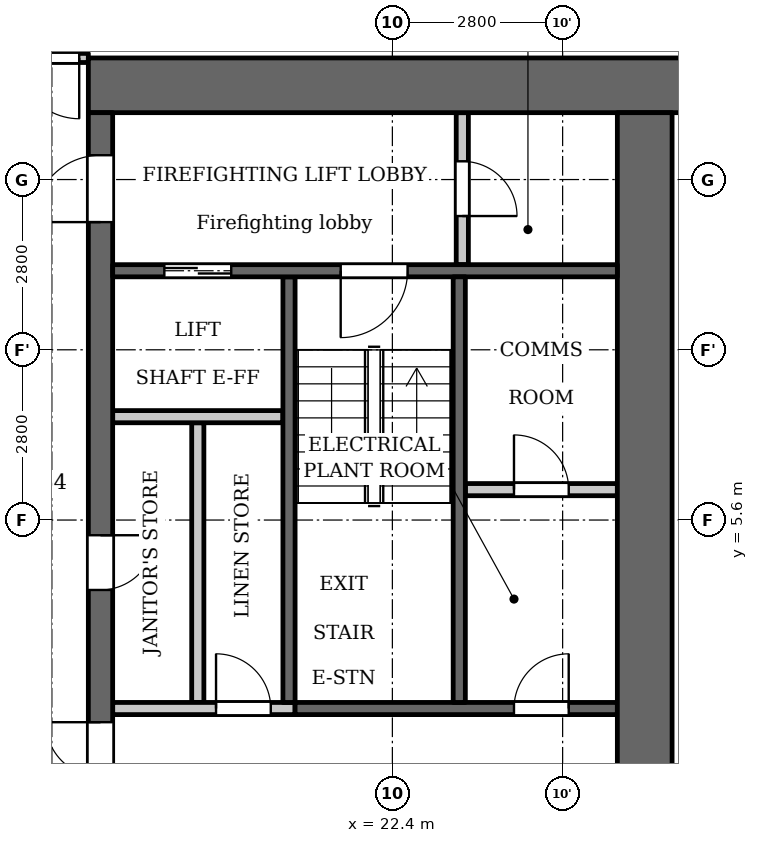
"""IFC4 building model, lengths in metres.
Left out: names, types, materials, properties, quantities, classifications, styles, units other than length and angle.
Written with IfcOpenShell. Run it as: python <this file> out.ifc"""

import sys

from ifc_helpers import new_model, si_unit, direction, frame, frame_2d, origin, place, context, subcontext, project, spatial, rectangle, extrude, element, fill, save


model = new_model("IFC4")
c1 = context("Model", 3, precision=1e-05, world=origin(), true_north=direction((0.0, 1.0)))
c2 = subcontext(c1, "Body", "Model", "MODEL_VIEW")
j1 = project(units=[si_unit("LENGTHUNIT", "METRE"), si_unit("PLANEANGLEUNIT", "RADIAN")], contexts=[c1])
p1 = place(None, origin())
s1 = spatial("IfcSite", under=j1, at=p1, CompositionType="ELEMENT")
p2 = place(p1, origin())
s2 = spatial("IfcBuilding", under=s1, at=p2, CompositionType="ELEMENT")
p3 = place(p2, frame((0.0, 0.0, 118.3)))
s3 = spatial("IfcBuildingStorey", under=s2, at=p3, CompositionType="ELEMENT", Elevation=118.3)
p4 = place(p3, frame((20.7, 2.6, 0.0), z_axis=(0.0, 0.0, 1.0), x_axis=(0.0, 1.0, 0.0)))
e1 = element("IfcWall", 1, at=p4, inside=s3, PredefinedType="SHEAR", context=c2, shape_type="SweptSolid", body=[
    extrude(rectangle(XDim=7.0, YDim=0.2, at=frame_2d((3.5, 0.0))), origin(), (0.0, 0.0, 1.0), 3.2),
])
p5 = place(p3, frame((20.8, 2.5, 0.0), z_axis=(0.0, 0.0, 1.0), x_axis=(1.0, 0.0, 0.0)))
e2 = element("IfcWall", 2, at=p5, inside=s3, PredefinedType="SHEAR", context=c2, shape_type="SweptSolid", body=[
    extrude(rectangle(XDim=5.3, YDim=0.2, at=frame_2d((2.65, 0.0))), origin(), (0.0, 0.0, 1.0), 3.2),
])
p6 = place(p5, frame((3.6, 0.0, 0.0)))
e3 = element("IfcOpeningElement", 3, at=p6, cuts=e2, PredefinedType="OPENING", context=c2, shape_type="SweptSolid", body=[
    extrude(rectangle(XDim=0.9, YDim=2.1, at=frame_2d((0.45, 1.05))), frame((0.0, 0.11, 0.0), z_axis=(0.0, -1.0, 0.0), x_axis=(1.0, 0.0, 0.0)), (0.0, 0.0, 1.0), 0.22),
])
p7 = place(p3, frame((17.4, 12.75, 0.0), z_axis=(0.0, 0.0, 1.0), x_axis=(1.0, 0.0, 0.0)))
e4 = element("IfcWall", 4, at=p7, inside=s3, PredefinedType="SHEAR", context=c2, shape_type="SweptSolid", body=[
    extrude(rectangle(XDim=10.4, YDim=0.9, at=frame_2d((5.2, 0.0))), origin(), (0.0, 0.0, 1.0), 3.2),
])
p8 = place(p3, frame((19.2, 2.6, 0.0), z_axis=(0.0, 0.0, 1.0), x_axis=(0.0, 1.0, 0.0)))
e5 = element("IfcWall", 5, at=p8, inside=s3, PredefinedType="PARTITIONING", context=c2, shape_type="SweptSolid", body=[
    extrude(rectangle(XDim=4.6, YDim=0.2, at=frame_2d((2.3, 0.0))), origin(), (0.0, 0.0, 1.0), 3.2),
])
p9 = place(p3, frame((17.6, -12.3, 0.0), z_axis=(0.0, 0.0, 1.0), x_axis=(0.0, 1.0, 0.0)))
e6 = element("IfcWall", 6, at=p9, inside=s3, PredefinedType="SHEAR", context=c2, shape_type="SweptSolid", body=[
    extrude(rectangle(XDim=24.6, YDim=0.4, at=frame_2d((12.3, 0.0))), origin(), (0.0, 0.0, 1.0), 3.2),
])
p10 = place(p9, frame((6.0, 0.0, 0.0)))
e7 = element("IfcOpeningElement", 7, at=p10, cuts=e6, PredefinedType="OPENING", context=c2, shape_type="SweptSolid", body=[
    extrude(rectangle(XDim=1.1, YDim=2.1, at=frame_2d((0.55, 1.05))), frame((0.0, 0.21, 0.0), z_axis=(0.0, -1.0, 0.0), x_axis=(1.0, 0.0, 0.0)), (0.0, 0.0, 1.0), 0.42),
])
p11 = place(p9, frame((8.4, 0.0, 0.0)))
e8 = element("IfcOpeningElement", 8, at=p11, cuts=e6, PredefinedType="OPENING", context=c2, shape_type="SweptSolid", body=[
    extrude(rectangle(XDim=1.1, YDim=2.1, at=frame_2d((0.55, 1.05))), frame((0.0, 0.21, 0.0), z_axis=(0.0, -1.0, 0.0), x_axis=(1.0, 0.0, 0.0)), (0.0, 0.0, 1.0), 0.42),
])
p12 = place(p9, frame((10.8, 0.0, 0.0)))
e9 = element("IfcOpeningElement", 9, at=p12, cuts=e6, PredefinedType="OPENING", context=c2, shape_type="SweptSolid", body=[
    extrude(rectangle(XDim=1.1, YDim=2.1, at=frame_2d((0.55, 1.05))), frame((0.0, 0.21, 0.0), z_axis=(0.0, -1.0, 0.0), x_axis=(1.0, 0.0, 0.0)), (0.0, 0.0, 1.0), 0.42),
])
p13 = place(p9, frame((16.75, 0.0, 0.0)))
e10 = element("IfcOpeningElement", 10, at=p13, cuts=e6, PredefinedType="OPENING", context=c2, shape_type="SweptSolid", body=[
    extrude(rectangle(XDim=0.9, YDim=2.1, at=frame_2d((0.45, 1.05))), frame((0.0, 0.21, 0.0), z_axis=(0.0, -1.0, 0.0), x_axis=(1.0, 0.0, 0.0)), (0.0, 0.0, 1.0), 0.42),
])
p14 = place(p9, frame((22.8, 0.0, 0.0)))
e11 = element("IfcOpeningElement", 11, at=p14, cuts=e6, PredefinedType="OPENING", context=c2, shape_type="SweptSolid", body=[
    extrude(rectangle(XDim=1.1, YDim=2.1, at=frame_2d((0.55, 1.05))), frame((0.0, 0.21, 0.0), z_axis=(0.0, -1.0, 0.0), x_axis=(1.0, 0.0, 0.0)), (0.0, 0.0, 1.0), 0.42),
])
p15 = place(p9, frame((0.7, 0.0, 0.0)))
e12 = element("IfcOpeningElement", 12, at=p15, cuts=e6, PredefinedType="OPENING", context=c2, shape_type="SweptSolid", body=[
    extrude(rectangle(XDim=1.1, YDim=2.1, at=frame_2d((0.55, 1.05))), frame((0.0, 0.21, 0.0), z_axis=(0.0, -1.0, 0.0), x_axis=(1.0, 0.0, 0.0)), (0.0, 0.0, 1.0), 0.42),
])
p16 = place(p9, frame((12.775, 0.0, 0.0)))
e13 = element("IfcOpeningElement", 13, at=p16, cuts=e6, PredefinedType="OPENING", context=c2, shape_type="SweptSolid", body=[
    extrude(rectangle(XDim=1.8, YDim=2.1, at=frame_2d((0.9, 1.05))), frame((0.0, 0.21, 0.0), z_axis=(0.0, -1.0, 0.0), x_axis=(1.0, 0.0, 0.0)), (0.0, 0.0, 1.0), 0.42),
])
p17 = place(p3, frame((26.55, -12.3, 0.0), z_axis=(0.0, 0.0, 1.0), x_axis=(0.0, 1.0, 0.0)))
e14 = element("IfcWall", 14, at=p17, inside=s3, PredefinedType="SHEAR", context=c2, shape_type="SweptSolid", body=[
    extrude(rectangle(XDim=24.6, YDim=0.9, at=frame_2d((12.3, 0.0))), origin(), (0.0, 0.0, 1.0), 3.2),
])
p18 = place(p3, frame((23.55, 9.8, 0.0), z_axis=(0.0, 0.0, 1.0), x_axis=(0.0, 1.0, 0.0)))
e15 = element("IfcWall", 15, at=p18, inside=s3, PredefinedType="PARTITIONING", context=c2, shape_type="SweptSolid", body=[
    extrude(rectangle(XDim=2.5, YDim=0.2, at=frame_2d((1.25, 0.0))), origin(), (0.0, 0.0, 1.0), 3.2),
])
p19 = place(p18, frame((0.8, 0.0, 0.0)))
e16 = element("IfcOpeningElement", 16, at=p19, cuts=e15, PredefinedType="OPENING", context=c2, shape_type="SweptSolid", body=[
    extrude(rectangle(XDim=0.9, YDim=2.1, at=frame_2d((0.45, 1.05))), frame((0.0, 0.11, 0.0), z_axis=(0.0, -1.0, 0.0), x_axis=(1.0, 0.0, 0.0)), (0.0, 0.0, 1.0), 0.22),
])
p20 = place(p3, frame((23.6, 6.1, 0.0), z_axis=(0.0, 0.0, 1.0), x_axis=(1.0, 0.0, 0.0)))
e17 = element("IfcWall", 17, at=p20, inside=s3, PredefinedType="PARTITIONING", context=c2, shape_type="SweptSolid", body=[
    extrude(rectangle(XDim=2.5, YDim=0.2, at=frame_2d((1.25, 0.0))), origin(), (0.0, 0.0, 1.0), 3.2),
])
p21 = place(p20, frame((0.8, 0.0, 0.0)))
e18 = element("IfcOpeningElement", 18, at=p21, cuts=e17, PredefinedType="OPENING", context=c2, shape_type="SweptSolid", body=[
    extrude(rectangle(XDim=0.9, YDim=2.1, at=frame_2d((0.45, 1.05))), frame((0.0, 0.11, 0.0), z_axis=(0.0, -1.0, 0.0), x_axis=(1.0, 0.0, 0.0)), (0.0, 0.0, 1.0), 0.22),
])
p22 = place(p3, frame((17.8, 2.5, 0.0), z_axis=(0.0, 0.0, 1.0), x_axis=(1.0, 0.0, 0.0)))
e19 = element("IfcWall", 19, at=p22, inside=s3, PredefinedType="PARTITIONING", context=c2, shape_type="SweptSolid", body=[
    extrude(rectangle(XDim=3.0, YDim=0.2, at=frame_2d((1.5, 0.0))), origin(), (0.0, 0.0, 1.0), 3.2),
])
p23 = place(p22, frame((1.7, 0.0, 0.0)))
e20 = element("IfcOpeningElement", 20, at=p23, cuts=e19, PredefinedType="OPENING", context=c2, shape_type="SweptSolid", body=[
    extrude(rectangle(XDim=0.9, YDim=2.1, at=frame_2d((0.45, 1.05))), frame((0.0, 0.11, 0.0), z_axis=(0.0, -1.0, 0.0), x_axis=(1.0, 0.0, 0.0)), (0.0, 0.0, 1.0), 0.22),
])
p24 = place(p3, frame((17.8, 7.3, 0.0), z_axis=(0.0, 0.0, 1.0), x_axis=(1.0, 0.0, 0.0)))
e21 = element("IfcWall", 21, at=p24, inside=s3, PredefinedType="PARTITIONING", context=c2, shape_type="SweptSolid", body=[
    extrude(rectangle(XDim=2.8, YDim=0.2, at=frame_2d((1.4, 0.0))), origin(), (0.0, 0.0, 1.0), 3.2),
])
p25 = place(p3, frame((17.8, 9.7, 0.0), z_axis=(0.0, 0.0, 1.0), x_axis=(1.0, 0.0, 0.0)))
e22 = element("IfcWall", 22, at=p25, inside=s3, PredefinedType="SHEAR", context=c2, shape_type="SweptSolid", body=[
    extrude(rectangle(XDim=8.3, YDim=0.2, at=frame_2d((4.15, 0.0))), origin(), (0.0, 0.0, 1.0), 3.2),
])
p26 = place(p25, frame((0.85, 0.0, 0.0)))
e23 = element("IfcOpeningElement", 23, at=p26, cuts=e22, PredefinedType="OPENING", context=c2, shape_type="SweptSolid", body=[
    extrude(rectangle(XDim=1.1, YDim=2.1, at=frame_2d((0.55, 1.05))), frame((0.0, 0.11, 0.0), z_axis=(0.0, -1.0, 0.0), x_axis=(1.0, 0.0, 0.0)), (0.0, 0.0, 1.0), 0.22),
])
p27 = place(p25, frame((3.75, 0.0, 0.0)))
e24 = element("IfcOpeningElement", 24, at=p27, cuts=e22, PredefinedType="OPENING", context=c2, shape_type="SweptSolid", body=[
    extrude(rectangle(XDim=1.1, YDim=2.1, at=frame_2d((0.55, 1.05))), frame((0.0, 0.11, 0.0), z_axis=(0.0, -1.0, 0.0), x_axis=(1.0, 0.0, 0.0)), (0.0, 0.0, 1.0), 0.22),
])
p28 = place(p3, frame((23.5, 2.6, 0.0), z_axis=(0.0, 0.0, 1.0), x_axis=(0.0, 1.0, 0.0)))
e25 = element("IfcWall", 25, at=p28, inside=s3, PredefinedType="SHEAR", context=c2, shape_type="SweptSolid", body=[
    extrude(rectangle(XDim=7.0, YDim=0.2, at=frame_2d((3.5, 0.0))), origin(), (0.0, 0.0, 1.0), 3.2),
])
p29 = place(p3, frame((-17.4, 13.2, 0.0), z_axis=(0.0, 0.0, 1.0), x_axis=(1.0, 0.0, 0.0)))
e26 = element("IfcWall", 26, at=p29, inside=s3, PredefinedType="PARTITIONING", context=c2, shape_type="SweptSolid", body=[
    extrude(rectangle(XDim=34.8, YDim=0.15, at=frame_2d((17.4, 0.0))), origin(), (0.0, 0.0, 1.0), 3.2),
])
p30 = place(p29, frame((0.25, 0.0, 0.0)))
e27 = element("IfcOpeningElement", 27, at=p30, cuts=e26, PredefinedType="OPENING", context=c2, shape_type="SweptSolid", body=[
    extrude(rectangle(XDim=1.0, YDim=2.1, at=frame_2d((0.5, 1.05))), frame((0.0, 0.085, 0.0), z_axis=(0.0, -1.0, 0.0), x_axis=(1.0, 0.0, 0.0)), (0.0, 0.0, 1.0), 0.17),
])
p31 = place(p29, frame((33.65, 0.0, 0.0)))
e28 = element("IfcOpeningElement", 28, at=p31, cuts=e26, PredefinedType="OPENING", context=c2, shape_type="SweptSolid", body=[
    extrude(rectangle(XDim=1.0, YDim=2.1, at=frame_2d((0.5, 1.05))), frame((0.0, 0.085, 0.0), z_axis=(0.0, -1.0, 0.0), x_axis=(1.0, 0.0, 0.0)), (0.0, 0.0, 1.0), 0.17),
])
p32 = place(p29, frame((15.75, 0.0, 0.0)))
e29 = element("IfcOpeningElement", 29, at=p32, cuts=e26, PredefinedType="OPENING", context=c2, shape_type="SweptSolid", body=[
    extrude(rectangle(XDim=1.0, YDim=2.1, at=frame_2d((0.5, 1.05))), frame((0.0, 0.085, 0.0), z_axis=(0.0, -1.0, 0.0), x_axis=(1.0, 0.0, 0.0)), (0.0, 0.0, 1.0), 0.17),
])
p33 = place(p29, frame((18.1, 0.0, 0.0)))
e30 = element("IfcOpeningElement", 30, at=p33, cuts=e26, PredefinedType="OPENING", context=c2, shape_type="SweptSolid", body=[
    extrude(rectangle(XDim=1.0, YDim=2.1, at=frame_2d((0.5, 1.05))), frame((0.0, 0.085, 0.0), z_axis=(0.0, -1.0, 0.0), x_axis=(1.0, 0.0, 0.0)), (0.0, 0.0, 1.0), 0.17),
])
p34 = place(p29, frame((23.55, 0.0, 0.0)))
e31 = element("IfcOpeningElement", 31, at=p34, cuts=e26, PredefinedType="OPENING", context=c2, shape_type="SweptSolid", body=[
    extrude(rectangle(XDim=1.0, YDim=2.1, at=frame_2d((0.5, 1.05))), frame((0.0, 0.085, 0.0), z_axis=(0.0, -1.0, 0.0), x_axis=(1.0, 0.0, 0.0)), (0.0, 0.0, 1.0), 0.17),
])
p35 = place(p13, origin())
e32 = element("IfcDoor", 32, at=p35, inside=s3, OperationType="SINGLE_SWING_RIGHT", PredefinedType="DOOR", context=c2, shape_type="SweptSolid", body=[
    extrude(rectangle(XDim=0.9, YDim=2.1, at=frame_2d((0.45, 1.05))), frame((0.0, 0.025, 0.0), z_axis=(0.0, -1.0, 0.0), x_axis=(1.0, 0.0, 0.0)), (0.0, 0.0, 1.0), 0.05),
])
fill(e10, e32)
p36 = place(p23, origin())
e33 = element("IfcDoor", 33, at=p36, inside=s3, OperationType="SINGLE_SWING_RIGHT", PredefinedType="DOOR", context=c2, shape_type="SweptSolid", body=[
    extrude(rectangle(XDim=0.9, YDim=2.1, at=frame_2d((0.45, 1.05))), frame((0.0, 0.025, 0.0), z_axis=(0.0, -1.0, 0.0), x_axis=(1.0, 0.0, 0.0)), (0.0, 0.0, 1.0), 0.05),
])
fill(e20, e33)
p37 = place(p26, origin())
e34 = element("IfcDoor", 34, at=p37, inside=s3, OperationType="DOUBLE_DOOR_SLIDING", PredefinedType="DOOR", context=c2, shape_type="SweptSolid", body=[
    extrude(rectangle(XDim=1.1, YDim=2.1, at=frame_2d((0.55, 1.05))), frame((0.0, 0.025, 0.0), z_axis=(0.0, -1.0, 0.0), x_axis=(1.0, 0.0, 0.0)), (0.0, 0.0, 1.0), 0.05),
])
fill(e23, e34)
p38 = place(p14, origin())
e35 = element("IfcDoor", 35, at=p38, inside=s3, OperationType="SINGLE_SWING_RIGHT", PredefinedType="DOOR", context=c2, shape_type="SweptSolid", body=[
    extrude(rectangle(XDim=1.1, YDim=2.1, at=frame_2d((0.55, 1.05))), frame((0.0, 0.025, 0.0), z_axis=(0.0, -1.0, 0.0), x_axis=(1.0, 0.0, 0.0)), (0.0, 0.0, 1.0), 0.05),
])
fill(e11, e35)
p39 = place(p19, origin())
e36 = element("IfcDoor", 36, at=p39, inside=s3, OperationType="SINGLE_SWING_LEFT", PredefinedType="DOOR", context=c2, shape_type="SweptSolid", body=[
    extrude(rectangle(XDim=0.9, YDim=2.1, at=frame_2d((0.45, 1.05))), frame((0.0, 0.025, 0.0), z_axis=(0.0, -1.0, 0.0), x_axis=(1.0, 0.0, 0.0)), (0.0, 0.0, 1.0), 0.05),
])
fill(e16, e36)
p40 = place(p27, origin())
e37 = element("IfcDoor", 37, at=p40, inside=s3, OperationType="SINGLE_SWING_LEFT", PredefinedType="DOOR", context=c2, shape_type="SweptSolid", body=[
    extrude(rectangle(XDim=1.1, YDim=2.1, at=frame_2d((0.55, 1.05))), frame((0.0, 0.025, 0.0), z_axis=(0.0, -1.0, 0.0), x_axis=(1.0, 0.0, 0.0)), (0.0, 0.0, 1.0), 0.05),
])
fill(e24, e37)
p41 = place(p16, origin())
e38 = element("IfcDoor", 38, at=p41, inside=s3, OperationType="DOUBLE_DOOR_SINGLE_SWING", PredefinedType="DOOR", context=c2, shape_type="SweptSolid", body=[
    extrude(rectangle(XDim=1.8, YDim=2.1, at=frame_2d((0.9, 1.05))), frame((0.0, 0.025, 0.0), z_axis=(0.0, -1.0, 0.0), x_axis=(1.0, 0.0, 0.0)), (0.0, 0.0, 1.0), 0.05),
])
fill(e13, e38)
p42 = place(p21, origin())
e39 = element("IfcDoor", 39, at=p42, inside=s3, OperationType="SINGLE_SWING_RIGHT", PredefinedType="DOOR", context=c2, shape_type="SweptSolid", body=[
    extrude(rectangle(XDim=0.9, YDim=2.1, at=frame_2d((0.45, 1.05))), frame((0.0, 0.025, 0.0), z_axis=(0.0, -1.0, 0.0), x_axis=(1.0, 0.0, 0.0)), (0.0, 0.0, 1.0), 0.05),
])
fill(e18, e39)
p43 = place(p6, origin())
e40 = element("IfcDoor", 40, at=p43, inside=s3, OperationType="SINGLE_SWING_LEFT", PredefinedType="DOOR", context=c2, shape_type="SweptSolid", body=[
    extrude(rectangle(XDim=0.9, YDim=2.1, at=frame_2d((0.45, 1.05))), frame((0.0, 0.025, 0.0), z_axis=(0.0, -1.0, 0.0), x_axis=(1.0, 0.0, 0.0)), (0.0, 0.0, 1.0), 0.05),
])
fill(e3, e40)
p44 = place(p31, origin())
e41 = element("IfcDoor", 41, at=p44, inside=s3, OperationType="SINGLE_SWING_RIGHT", PredefinedType="DOOR", context=c2, shape_type="SweptSolid", body=[
    extrude(rectangle(XDim=1.0, YDim=2.1, at=frame_2d((0.5, 1.05))), frame((0.0, 0.025, 0.0), z_axis=(0.0, -1.0, 0.0), x_axis=(1.0, 0.0, 0.0)), (0.0, 0.0, 1.0), 0.05),
])
fill(e28, e41)
save(model, sys.argv[1])
